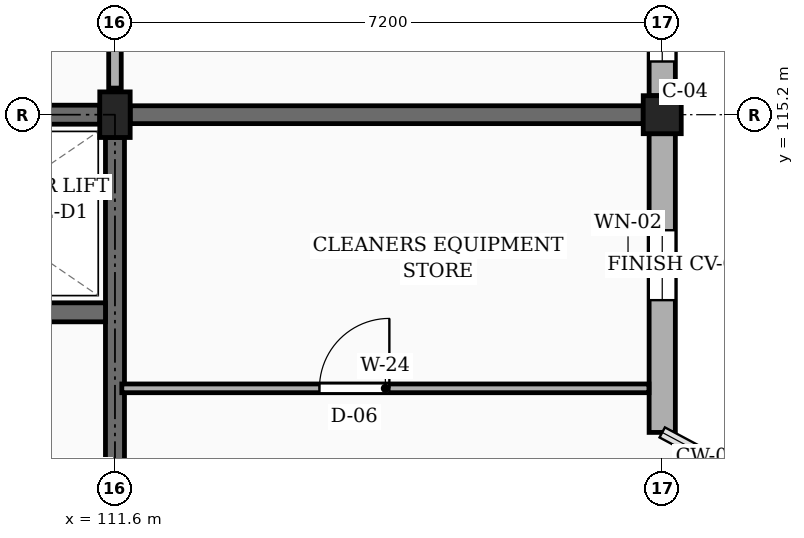
"""IFC4 building model, lengths in metres.
Left out: names, types, materials, properties, quantities, classifications, styles, units other than length and angle.
Written with IfcOpenShell. Run it as: python <this file> out.ifc"""

import sys

from ifc_helpers import new_model, si_unit, direction, frame, frame_2d, origin, origin_2d, place, context, subcontext, project, spatial, rectangle, extrude, element, fill, save


model = new_model("IFC4")
c1 = context("Model", 3, precision=1e-05, world=origin(), true_north=direction((0.0, 1.0)))
c2 = subcontext(c1, "Body", "Model", "MODEL_VIEW")
j1 = project(units=[si_unit("LENGTHUNIT", "METRE"), si_unit("PLANEANGLEUNIT", "RADIAN")], contexts=[c1])
p1 = place(None, origin())
s1 = spatial("IfcSite", under=j1, at=p1, CompositionType="ELEMENT")
p2 = place(p1, origin())
s2 = spatial("IfcBuilding", under=s1, at=p2, CompositionType="ELEMENT")
p3 = place(p2, frame((0.0, 0.0, 23.4)))
s3 = spatial("IfcBuildingStorey", under=s2, at=p3, CompositionType="ELEMENT", Elevation=23.4)
p4 = place(p3, frame((111.6, 115.2, 0.0), z_axis=(0.0, 0.0, 1.0), x_axis=(1.0, 0.0, 0.0)))
e1 = element("IfcColumn", 1, at=p4, inside=s3, PredefinedType="COLUMN", context=c2, shape_type="SweptSolid", body=[
    extrude(rectangle(XDim=0.4, YDim=0.6, at=origin_2d()), origin(), (0.0, 0.0, 1.0), 3.15),
])
p5 = place(p3, frame((118.8, 115.2, 0.0), z_axis=(0.0, 0.0, 1.0), x_axis=(1.0, 0.0, 0.0)))
e2 = element("IfcColumn", 2, at=p5, inside=s3, PredefinedType="COLUMN", context=c2, shape_type="SweptSolid", body=[
    extrude(rectangle(XDim=0.5, YDim=0.5, at=origin_2d()), origin(), (0.0, 0.0, 1.0), 3.15),
])
p6 = place(p3, frame((111.8, 115.2, 0.0), z_axis=(0.0, 0.0, 1.0), x_axis=(1.0, 0.0, 0.0)))
e3 = element("IfcWall", 3, at=p6, inside=s3, PredefinedType="SOLIDWALL", context=c2, shape_type="SweptSolid", body=[
    extrude(rectangle(XDim=6.75, YDim=0.235, at=frame_2d((3.375, 0.0))), origin(), (0.0, 0.0, 1.0), 2.19),
])
p7 = place(p3, frame((118.8, 111.02, 0.0), z_axis=(0.0, 0.0, 1.0), x_axis=(0.0, 1.0, 0.0)))
e4 = element("IfcWall", 4, at=p7, inside=s3, PredefinedType="SOLIDWALL", context=c2, shape_type="SweptSolid", body=[
    extrude(rectangle(XDim=3.93, YDim=0.345, at=frame_2d((1.965, 0.0))), origin(), (0.0, 0.0, 1.0), 2.46),
])
p8 = place(p7, frame((1.74, 0.0, 0.78)))
e5 = element("IfcOpeningElement", 5, at=p8, cuts=e4, PredefinedType="OPENING", context=c2, shape_type="SweptSolid", body=[
    extrude(rectangle(XDim=0.92, YDim=1.15, at=frame_2d((0.46, 0.575))), frame((0.0, 0.183, 0.0), z_axis=(0.0, -1.0, 0.0), x_axis=(1.0, 0.0, 0.0)), (0.0, 0.0, 1.0), 0.365),
])
p9 = place(p3, frame((118.8, 115.45, 0.0), z_axis=(0.0, 0.0, 1.0), x_axis=(0.0, 1.0, 0.0)))
e6 = element("IfcWall", 6, at=p9, inside=s3, PredefinedType="SOLIDWALL", context=c2, shape_type="SweptSolid", body=[
    extrude(rectangle(XDim=6.7, YDim=0.345, at=frame_2d((3.35, 0.0))), origin(), (0.0, 0.0, 1.0), 2.46),
])
p10 = place(p9, frame((0.45, 0.0, 0.78)))
e7 = element("IfcOpeningElement", 7, at=p10, cuts=e6, PredefinedType="OPENING", context=c2, shape_type="SweptSolid", body=[
    extrude(rectangle(XDim=1.0, YDim=1.15, at=frame_2d((0.5, 0.575))), frame((0.0, 0.183, 0.0), z_axis=(0.0, -1.0, 0.0), x_axis=(1.0, 0.0, 0.0)), (0.0, 0.0, 1.0), 0.365),
])
p11 = place(p9, frame((4.65, 0.0, 0.78)))
e8 = element("IfcOpeningElement", 8, at=p11, cuts=e6, PredefinedType="OPENING", context=c2, shape_type="SweptSolid", body=[
    extrude(rectangle(XDim=1.16, YDim=1.15, at=frame_2d((0.58, 0.575))), frame((0.0, 0.183, 0.0), z_axis=(0.0, -1.0, 0.0), x_axis=(1.0, 0.0, 0.0)), (0.0, 0.0, 1.0), 0.365),
])
p12 = place(p3, frame((104.6, 115.2, 0.0), z_axis=(0.0, 0.0, 1.0), x_axis=(1.0, 0.0, 0.0)))
e9 = element("IfcWall", 9, at=p12, inside=s3, PredefinedType="SHEAR", context=c2, shape_type="SweptSolid", body=[
    extrude(rectangle(XDim=6.8, YDim=0.25, at=frame_2d((3.4, 0.0))), origin(), (0.0, 0.0, 1.0), 2.89),
])
p13 = place(p3, frame((111.6, 108.3, 0.0), z_axis=(0.0, 0.0, 1.0), x_axis=(0.0, 1.0, 0.0)))
e10 = element("IfcWall", 10, at=p13, inside=s3, PredefinedType="SHEAR", context=c2, shape_type="SweptSolid", body=[
    extrude(rectangle(XDim=6.6, YDim=0.25, at=frame_2d((3.3, 0.0))), origin(), (0.0, 0.0, 1.0), 2.89),
])
p14 = place(p3, frame((108.125, 112.6, 0.0), z_axis=(0.0, 0.0, 1.0), x_axis=(1.0, 0.0, 0.0)))
e11 = element("IfcWall", 11, at=p14, inside=s3, PredefinedType="SHEAR", context=c2, shape_type="SweptSolid", body=[
    extrude(rectangle(XDim=3.35, YDim=0.25, at=frame_2d((1.675, 0.0))), origin(), (0.0, 0.0, 1.0), 2.89),
])
p15 = place(p14, frame((1.1, 0.0, 0.0)))
e12 = element("IfcOpeningElement", 12, at=p15, cuts=e11, PredefinedType="OPENING", context=c2, shape_type="SweptSolid", body=[
    extrude(rectangle(XDim=1.0, YDim=2.2, at=frame_2d((0.5, 1.1))), frame((0.0, 0.135, 0.0), z_axis=(0.0, -1.0, 0.0), x_axis=(1.0, 0.0, 0.0)), (0.0, 0.0, 1.0), 0.27),
])
p16 = place(p3, frame((111.6, 115.55, 0.0), z_axis=(0.0, 0.0, 1.0), x_axis=(0.0, 1.0, 0.0)))
e13 = element("IfcWall", 13, at=p16, inside=s3, PredefinedType="PARTITIONING", context=c2, shape_type="SweptSolid", body=[
    extrude(rectangle(XDim=6.5, YDim=0.165, at=frame_2d((3.25, 0.0))), origin(), (0.0, 0.0, 1.0), 2.325),
])
p17 = place(p16, frame((1.1, 0.0, 0.0)))
e14 = element("IfcOpeningElement", 14, at=p17, cuts=e13, PredefinedType="OPENING", context=c2, shape_type="SweptSolid", body=[
    extrude(rectangle(XDim=1.0, YDim=2.15, at=frame_2d((0.5, 1.075))), frame((0.0, 0.093, 0.0), z_axis=(0.0, -1.0, 0.0), x_axis=(1.0, 0.0, 0.0)), (0.0, 0.0, 1.0), 0.185),
])
p18 = place(p3, frame((111.69, 111.6, 0.0), z_axis=(0.0, 0.0, 1.0), x_axis=(1.0, 0.0, 0.0)))
e15 = element("IfcWall", 15, at=p18, inside=s3, PredefinedType="PARTITIONING", context=c2, shape_type="SweptSolid", body=[
    extrude(rectangle(XDim=6.935, YDim=0.115, at=frame_2d((3.468, 0.0))), origin(), (0.0, 0.0, 1.0), 2.325),
])
p19 = place(p18, frame((2.6, 0.0, 0.0)))
e16 = element("IfcOpeningElement", 16, at=p19, cuts=e15, PredefinedType="OPENING", context=c2, shape_type="SweptSolid", body=[
    extrude(rectangle(XDim=0.92, YDim=2.1, at=frame_2d((0.46, 1.05))), frame((0.0, 0.067, 0.0), z_axis=(0.0, -1.0, 0.0), x_axis=(1.0, 0.0, 0.0)), (0.0, 0.0, 1.0), 0.135),
])
p20 = place(p8, origin())
e17 = element("IfcWindow", 17, at=p20, inside=s3, PartitioningType="SINGLE_PANEL", PredefinedType="WINDOW", context=c2, shape_type="SweptSolid", body=[
    extrude(rectangle(XDim=0.92, YDim=1.15, at=frame_2d((0.46, 0.575))), frame((0.0, 0.03, 0.0), z_axis=(0.0, -1.0, 0.0), x_axis=(1.0, 0.0, 0.0)), (0.0, 0.0, 1.0), 0.06),
])
fill(e5, e17)
p21 = place(p10, origin())
e18 = element("IfcWindow", 18, at=p21, inside=s3, PartitioningType="SINGLE_PANEL", PredefinedType="WINDOW", context=c2, shape_type="SweptSolid", body=[
    extrude(rectangle(XDim=1.0, YDim=1.15, at=frame_2d((0.5, 0.575))), frame((0.0, 0.03, 0.0), z_axis=(0.0, -1.0, 0.0), x_axis=(1.0, 0.0, 0.0)), (0.0, 0.0, 1.0), 0.06),
])
fill(e7, e18)
p22 = place(p19, origin())
e19 = element("IfcDoor", 19, at=p22, inside=s3, OperationType="SINGLE_SWING_RIGHT", PredefinedType="DOOR", context=c2, shape_type="SweptSolid", body=[
    extrude(rectangle(XDim=0.92, YDim=2.1, at=frame_2d((0.46, 1.05))), frame((0.0, 0.025, 0.0), z_axis=(0.0, -1.0, 0.0), x_axis=(1.0, 0.0, 0.0)), (0.0, 0.0, 1.0), 0.05),
])
fill(e16, e19)
save(model, sys.argv[1])
